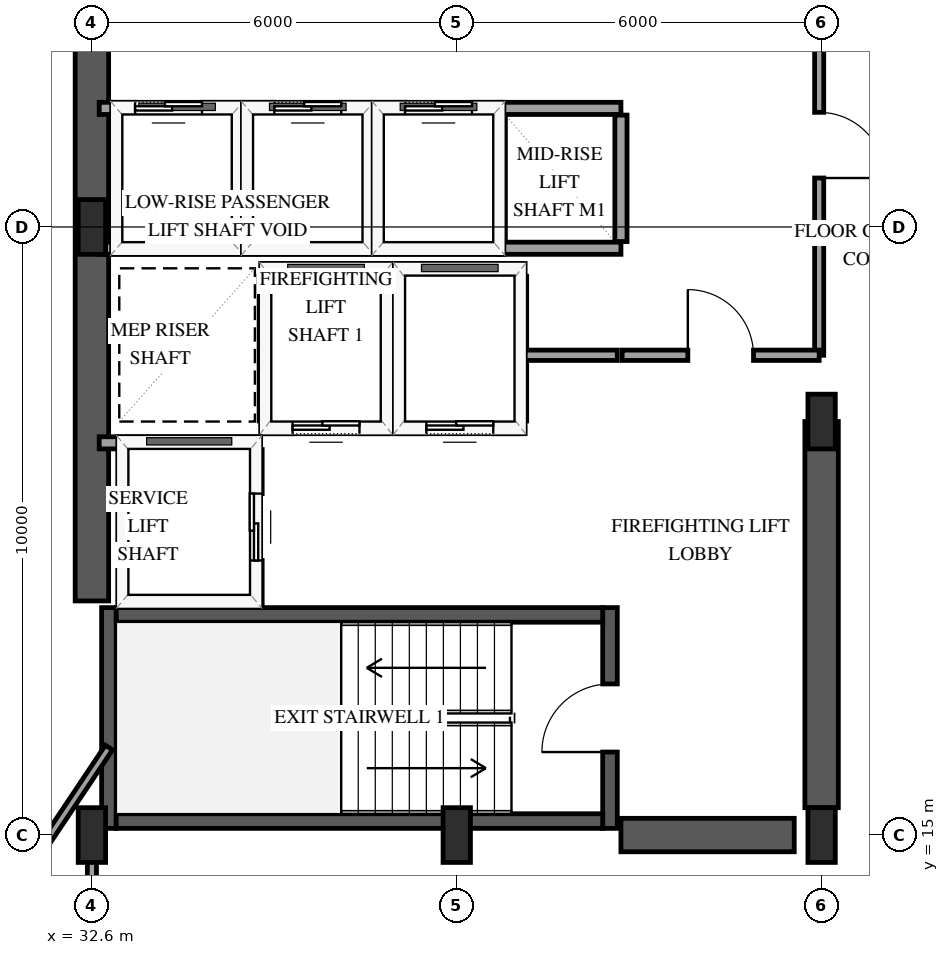
"""IFC4 building model, lengths in metres.
Left out: names, types, materials, properties, quantities, classifications, styles, units other than length and angle.
Written with IfcOpenShell. Run it as: python <this file> out.ifc"""

import sys

from ifc_helpers import new_model, si_unit, direction, frame, frame_2d, origin, origin_2d, place, context, subcontext, project, spatial, rectangle, extrude, element, fill, save


model = new_model("IFC4")
c1 = context("Model", 3, precision=1e-05, world=origin(), true_north=direction((0.0, 1.0)))
c2 = subcontext(c1, "Body", "Model", "MODEL_VIEW")
j1 = project(units=[si_unit("LENGTHUNIT", "METRE"), si_unit("PLANEANGLEUNIT", "RADIAN")], contexts=[c1])
p1 = place(None, origin())
s1 = spatial("IfcSite", under=j1, at=p1, CompositionType="ELEMENT")
p2 = place(p1, origin())
s2 = spatial("IfcBuilding", under=s1, at=p2, CompositionType="ELEMENT")
p3 = place(p2, frame((0.0, 0.0, 87.4)))
s3 = spatial("IfcBuildingStorey", under=s2, at=p3, CompositionType="ELEMENT", Elevation=87.4)
p4 = place(p3, frame((32.88, 15.11, 0.0), z_axis=(0.0, 0.0, 1.0), x_axis=(0.0, 1.0, 0.0)))
e1 = element("IfcWall", 1, at=p4, inside=s3, PredefinedType="SHEAR", context=c2, shape_type="SweptSolid", body=[
    extrude(rectangle(XDim=3.63, YDim=0.24, at=frame_2d((1.815, 0.0))), origin(), (0.0, 0.0, 1.0), 3.9),
])
p5 = place(p3, frame((41.12, 15.11, 0.0), z_axis=(0.0, 0.0, 1.0), x_axis=(0.0, 1.0, 0.0)))
e2 = element("IfcWall", 2, at=p5, inside=s3, PredefinedType="SHEAR", context=c2, shape_type="SweptSolid", body=[
    extrude(rectangle(XDim=3.63, YDim=0.24, at=frame_2d((1.815, 0.0))), origin(), (0.0, 0.0, 1.0), 3.9),
])
p6 = place(p5, frame((1.255, 0.0, 0.0)))
e3 = element("IfcOpeningElement", 3, at=p6, cuts=e2, PredefinedType="OPENING", context=c2, shape_type="SweptSolid", body=[
    extrude(rectangle(XDim=1.12, YDim=2.15, at=frame_2d((0.56, 1.075))), frame((0.0, 0.13, 0.0), z_axis=(0.0, -1.0, 0.0), x_axis=(1.0, 0.0, 0.0)), (0.0, 0.0, 1.0), 0.26),
])
for number, where, z_axis, x_axis in (
    (4, (33.0, 15.23, 0.0), (0.0, 0.0, 1.0), (1.0, 0.0, 0.0)),
    (5, (33.0, 18.62, 0.0), (0.0, 0.0, 1.0), (1.0, 0.0, 0.0)),
):
    element("IfcWall", number, at=place(p3, frame(where, z_axis=z_axis, x_axis=x_axis)), inside=s3, PredefinedType="SHEAR", context=c2, shape_type="SweptSolid", body=[
        extrude(rectangle(XDim=8.0, YDim=0.24, at=frame_2d((4.0, 0.0))), origin(), (0.0, 0.0, 1.0), 3.9),
    ])
p7 = place(p3, frame((32.6, 18.85, 0.0), z_axis=(0.0, 0.0, 1.0), x_axis=(0.0, 1.0, 0.0)))
e6 = element("IfcWall", 6, at=p7, inside=s3, PredefinedType="SHEAR", context=c2, shape_type="SweptSolid", body=[
    extrude(rectangle(XDim=12.3, YDim=0.55, at=frame_2d((6.15, 0.0))), origin(), (0.0, 0.0, 1.0), 3.9),
])
p8 = place(p3, frame((41.3, 15.0, 0.0), z_axis=(0.0, 0.0, 1.0), x_axis=(1.0, 0.0, 0.0)))
e7 = element("IfcWall", 7, at=p8, inside=s3, PredefinedType="SHEAR", context=c2, shape_type="SweptSolid", body=[
    extrude(rectangle(XDim=2.85, YDim=0.55, at=frame_2d((1.425, 0.0))), origin(), (0.0, 0.0, 1.0), 3.9),
])
p9 = place(p3, frame((44.6, 15.45, 0.0), z_axis=(0.0, 0.0, 1.0), x_axis=(0.0, 1.0, 0.0)))
e8 = element("IfcWall", 8, at=p9, inside=s3, PredefinedType="SHEAR", context=c2, shape_type="SweptSolid", body=[
    extrude(rectangle(XDim=6.35, YDim=0.55, at=frame_2d((3.175, 0.0))), origin(), (0.0, 0.0, 1.0), 3.9),
])
for number, where, z_axis, x_axis in (
    (9, (32.6, 15.0, -0.3), (0.0, 0.0, 1.0), (1.0, 0.0, 0.0)),
    (10, (32.6, 25.0, -0.3), (0.0, 0.0, 1.0), (1.0, 0.0, 0.0)),
    (11, (38.6, 15.0, -0.3), (0.0, 0.0, 1.0), (1.0, 0.0, 0.0)),
    (12, (44.6, 15.0, -0.3), (0.0, 0.0, 1.0), (1.0, 0.0, 0.0)),
    (13, (44.6, 21.8, -0.3), (0.0, 0.0, 1.0), (1.0, 0.0, 0.0)),
):
    element("IfcColumn", number, at=place(p3, frame(where, z_axis=z_axis, x_axis=x_axis)), inside=s3, PredefinedType="PILASTER", context=c2, shape_type="SweptSolid", body=[
        extrude(rectangle(XDim=0.45, YDim=0.9, at=origin_2d()), origin(), (0.0, 0.0, 1.0), 4.2),
    ])
p10 = place(p3, frame((35.45, 21.7, 0.0), z_axis=(0.0, 0.0, 1.0), x_axis=(1.0, 0.0, 0.0)))
e14 = element("IfcWall", 14, at=p10, inside=s3, PredefinedType="SOLIDWALL", context=c2, shape_type="SweptSolid", body=[
    extrude(rectangle(XDim=2.0, YDim=0.2, at=frame_2d((1.0, 0.0))), origin(), (0.0, 0.0, 1.0), 3.6),
])
p11 = place(p10, frame((0.45, 0.0, 0.0)))
e15 = element("IfcOpeningElement", 15, at=p11, cuts=e14, PredefinedType="OPENING", context=c2, shape_type="SweptSolid", body=[
    extrude(rectangle(XDim=1.1, YDim=2.15, at=frame_2d((0.55, 1.075))), frame((0.0, 0.11, 0.0), z_axis=(0.0, -1.0, 0.0), x_axis=(1.0, 0.0, 0.0)), (0.0, 0.0, 1.0), 0.22),
])
p12 = place(p3, frame((35.45, 24.3, 0.0), z_axis=(0.0, 0.0, 1.0), x_axis=(1.0, 0.0, 0.0)))
e16 = element("IfcWall", 16, at=p12, inside=s3, PredefinedType="SOLIDWALL", context=c2, shape_type="SweptSolid", body=[
    extrude(rectangle(XDim=2.0, YDim=0.2, at=frame_2d((1.0, 0.0))), origin(), (0.0, 0.0, 1.0), 3.6),
])
for number, where, z_axis, x_axis in (
    (17, (35.45, 21.81, 0.0), (0.0, 0.0, 1.0), (0.0, 1.0, 0.0)),
    (18, (37.45, 21.81, 0.0), (0.0, 0.0, 1.0), (0.0, 1.0, 0.0)),
):
    element("IfcWall", number, at=place(p3, frame(where, z_axis=z_axis, x_axis=x_axis)), inside=s3, PredefinedType="SOLIDWALL", context=c2, shape_type="SweptSolid", body=[
        extrude(rectangle(XDim=2.38, YDim=0.2, at=frame_2d((1.19, 0.0))), origin(), (0.0, 0.0, 1.0), 3.6),
    ])
p13 = place(p3, frame((37.65, 21.7, 0.0), z_axis=(0.0, 0.0, 1.0), x_axis=(1.0, 0.0, 0.0)))
e19 = element("IfcWall", 19, at=p13, inside=s3, PredefinedType="SOLIDWALL", context=c2, shape_type="SweptSolid", body=[
    extrude(rectangle(XDim=2.0, YDim=0.2, at=frame_2d((1.0, 0.0))), origin(), (0.0, 0.0, 1.0), 3.6),
])
p14 = place(p13, frame((0.45, 0.0, 0.0)))
e20 = element("IfcOpeningElement", 20, at=p14, cuts=e19, PredefinedType="OPENING", context=c2, shape_type="SweptSolid", body=[
    extrude(rectangle(XDim=1.1, YDim=2.15, at=frame_2d((0.55, 1.075))), frame((0.0, 0.11, 0.0), z_axis=(0.0, -1.0, 0.0), x_axis=(1.0, 0.0, 0.0)), (0.0, 0.0, 1.0), 0.22),
])
p15 = place(p3, frame((37.65, 24.3, 0.0), z_axis=(0.0, 0.0, 1.0), x_axis=(1.0, 0.0, 0.0)))
e21 = element("IfcWall", 21, at=p15, inside=s3, PredefinedType="SOLIDWALL", context=c2, shape_type="SweptSolid", body=[
    extrude(rectangle(XDim=2.0, YDim=0.2, at=frame_2d((1.0, 0.0))), origin(), (0.0, 0.0, 1.0), 3.6),
])
p16 = place(p3, frame((39.65, 21.81, 0.0), z_axis=(0.0, 0.0, 1.0), x_axis=(0.0, 1.0, 0.0)))
e22 = element("IfcWall", 22, at=p16, inside=s3, PredefinedType="SOLIDWALL", context=c2, shape_type="SweptSolid", body=[
    extrude(rectangle(XDim=2.38, YDim=0.2, at=frame_2d((1.19, 0.0))), origin(), (0.0, 0.0, 1.0), 3.6),
])
p17 = place(p3, frame((32.72, 21.45, 0.0), z_axis=(0.0, 0.0, 1.0), x_axis=(1.0, 0.0, 0.0)))
e23 = element("IfcWall", 23, at=p17, inside=s3, PredefinedType="SOLIDWALL", context=c2, shape_type="SweptSolid", body=[
    extrude(rectangle(XDim=2.58, YDim=0.2, at=frame_2d((1.29, 0.0))), origin(), (0.0, 0.0, 1.0), 3.6),
])
p18 = place(p3, frame((35.3, 18.79, 0.0), z_axis=(0.0, 0.0, 1.0), x_axis=(0.0, 1.0, 0.0)))
e24 = element("IfcWall", 24, at=p18, inside=s3, PredefinedType="SOLIDWALL", context=c2, shape_type="SweptSolid", body=[
    extrude(rectangle(XDim=2.55, YDim=0.2, at=frame_2d((1.275, 0.0))), origin(), (0.0, 0.0, 1.0), 3.6),
])
p19 = place(p18, frame((0.725, 0.0, 0.0)))
e25 = element("IfcOpeningElement", 25, at=p19, cuts=e24, PredefinedType="OPENING", context=c2, shape_type="SweptSolid", body=[
    extrude(rectangle(XDim=1.1, YDim=2.15, at=frame_2d((0.55, 1.075))), frame((0.0, 0.11, 0.0), z_axis=(0.0, -1.0, 0.0), x_axis=(1.0, 0.0, 0.0)), (0.0, 0.0, 1.0), 0.22),
])
p20 = place(p3, frame((32.72, 24.65, 0.0), z_axis=(0.0, 0.0, 1.0), x_axis=(1.0, 0.0, 0.0)))
e26 = element("IfcWall", 26, at=p20, inside=s3, PredefinedType="SOLIDWALL", context=c2, shape_type="SweptSolid", body=[
    extrude(rectangle(XDim=2.28, YDim=0.2, at=frame_2d((1.14, 0.0))), origin(), (0.0, 0.0, 1.0), 3.6),
])
p21 = place(p3, frame((32.72, 26.95, 0.0), z_axis=(0.0, 0.0, 1.0), x_axis=(1.0, 0.0, 0.0)))
e27 = element("IfcWall", 27, at=p21, inside=s3, PredefinedType="SOLIDWALL", context=c2, shape_type="SweptSolid", body=[
    extrude(rectangle(XDim=2.28, YDim=0.2, at=frame_2d((1.14, 0.0))), origin(), (0.0, 0.0, 1.0), 2.974),
])
p22 = place(p21, frame((0.59, 0.0, 0.0)))
e28 = element("IfcOpeningElement", 28, at=p22, cuts=e27, PredefinedType="OPENING", context=c2, shape_type="SweptSolid", body=[
    extrude(rectangle(XDim=1.1, YDim=2.15, at=frame_2d((0.55, 1.075))), frame((0.0, 0.11, 0.0), z_axis=(0.0, -1.0, 0.0), x_axis=(1.0, 0.0, 0.0)), (0.0, 0.0, 1.0), 0.22),
])
p23 = place(p3, frame((35.0, 24.76, 0.0), z_axis=(0.0, 0.0, 1.0), x_axis=(0.0, 1.0, 0.0)))
e29 = element("IfcWall", 29, at=p23, inside=s3, PredefinedType="SOLIDWALL", context=c2, shape_type="SweptSolid", body=[
    extrude(rectangle(XDim=2.08, YDim=0.2, at=frame_2d((1.04, 0.0))), origin(), (0.0, 0.0, 1.0), 3.6),
])
p24 = place(p3, frame((35.15, 24.65, 0.0), z_axis=(0.0, 0.0, 1.0), x_axis=(1.0, 0.0, 0.0)))
e30 = element("IfcWall", 30, at=p24, inside=s3, PredefinedType="SOLIDWALL", context=c2, shape_type="SweptSolid", body=[
    extrude(rectangle(XDim=2.0, YDim=0.2, at=frame_2d((1.0, 0.0))), origin(), (0.0, 0.0, 1.0), 3.6),
])
p25 = place(p3, frame((35.15, 26.95, 0.0), z_axis=(0.0, 0.0, 1.0), x_axis=(1.0, 0.0, 0.0)))
e31 = element("IfcWall", 31, at=p25, inside=s3, PredefinedType="SOLIDWALL", context=c2, shape_type="SweptSolid", body=[
    extrude(rectangle(XDim=2.0, YDim=0.2, at=frame_2d((1.0, 0.0))), origin(), (0.0, 0.0, 1.0), 2.974),
])
p26 = place(p25, frame((0.45, 0.0, 0.0)))
e32 = element("IfcOpeningElement", 32, at=p26, cuts=e31, PredefinedType="OPENING", context=c2, shape_type="SweptSolid", body=[
    extrude(rectangle(XDim=1.1, YDim=2.15, at=frame_2d((0.55, 1.075))), frame((0.0, 0.11, 0.0), z_axis=(0.0, -1.0, 0.0), x_axis=(1.0, 0.0, 0.0)), (0.0, 0.0, 1.0), 0.22),
])
p27 = place(p3, frame((37.15, 24.76, 0.0), z_axis=(0.0, 0.0, 1.0), x_axis=(0.0, 1.0, 0.0)))
e33 = element("IfcWall", 33, at=p27, inside=s3, PredefinedType="SOLIDWALL", context=c2, shape_type="SweptSolid", body=[
    extrude(rectangle(XDim=2.08, YDim=0.2, at=frame_2d((1.04, 0.0))), origin(), (0.0, 0.0, 1.0), 3.6),
])
p28 = place(p3, frame((37.3, 24.65, 0.0), z_axis=(0.0, 0.0, 1.0), x_axis=(1.0, 0.0, 0.0)))
e34 = element("IfcWall", 34, at=p28, inside=s3, PredefinedType="SOLIDWALL", context=c2, shape_type="SweptSolid", body=[
    extrude(rectangle(XDim=2.0, YDim=0.2, at=frame_2d((1.0, 0.0))), origin(), (0.0, 0.0, 1.0), 3.6),
])
p29 = place(p3, frame((37.3, 26.95, 0.0), z_axis=(0.0, 0.0, 1.0), x_axis=(1.0, 0.0, 0.0)))
e35 = element("IfcWall", 35, at=p29, inside=s3, PredefinedType="SOLIDWALL", context=c2, shape_type="SweptSolid", body=[
    extrude(rectangle(XDim=2.0, YDim=0.2, at=frame_2d((1.0, 0.0))), origin(), (0.0, 0.0, 1.0), 2.974),
])
p30 = place(p29, frame((0.45, 0.0, 0.0)))
e36 = element("IfcOpeningElement", 36, at=p30, cuts=e35, PredefinedType="OPENING", context=c2, shape_type="SweptSolid", body=[
    extrude(rectangle(XDim=1.1, YDim=2.15, at=frame_2d((0.55, 1.075))), frame((0.0, 0.11, 0.0), z_axis=(0.0, -1.0, 0.0), x_axis=(1.0, 0.0, 0.0)), (0.0, 0.0, 1.0), 0.22),
])
p31 = place(p3, frame((39.3, 24.76, 0.0), z_axis=(0.0, 0.0, 1.0), x_axis=(0.0, 1.0, 0.0)))
e37 = element("IfcWall", 37, at=p31, inside=s3, PredefinedType="SOLIDWALL", context=c2, shape_type="SweptSolid", body=[
    extrude(rectangle(XDim=2.08, YDim=0.2, at=frame_2d((1.04, 0.0))), origin(), (0.0, 0.0, 1.0), 3.6),
])
p32 = place(p3, frame((39.3, 24.65, 0.0), z_axis=(0.0, 0.0, 1.0), x_axis=(1.0, 0.0, 0.0)))
e38 = element("IfcWall", 38, at=p32, inside=s3, PredefinedType="SOLIDWALL", context=c2, shape_type="SweptSolid", body=[
    extrude(rectangle(XDim=2.0, YDim=0.2, at=frame_2d((1.0, 0.0))), origin(), (0.0, 0.0, 1.0), 3.6),
])
p33 = place(p3, frame((39.3, 26.95, 0.0), z_axis=(0.0, 0.0, 1.0), x_axis=(1.0, 0.0, 0.0)))
e39 = element("IfcWall", 39, at=p33, inside=s3, PredefinedType="SOLIDWALL", context=c2, shape_type="SweptSolid", body=[
    extrude(rectangle(XDim=2.0, YDim=0.2, at=frame_2d((1.0, 0.0))), origin(), (0.0, 0.0, 1.0), 2.974),
])
p34 = place(p3, frame((41.3, 24.76, 0.0), z_axis=(0.0, 0.0, 1.0), x_axis=(0.0, 1.0, 0.0)))
e40 = element("IfcWall", 40, at=p34, inside=s3, PredefinedType="SOLIDWALL", context=c2, shape_type="SweptSolid", body=[
    extrude(rectangle(XDim=2.08, YDim=0.2, at=frame_2d((1.04, 0.0))), origin(), (0.0, 0.0, 1.0), 3.6),
])
p35 = place(p3, frame((44.56, 29.8, 0.0), z_axis=(0.0, 0.0, 1.0), x_axis=(0.0, -1.0, 0.0)))
e41 = element("IfcWall", 41, at=p35, inside=s3, PredefinedType="PARTITIONING", context=c2, shape_type="SweptSolid", body=[
    extrude(rectangle(XDim=6.91, YDim=0.15, at=frame_2d((3.455, 0.0))), origin(), (0.0, 0.0, 1.0), 2.64),
])
p36 = place(p35, frame((2.915, 0.0, 0.0)))
e42 = element("IfcOpeningElement", 42, at=p36, cuts=e41, PredefinedType="OPENING", context=c2, shape_type="SweptSolid", body=[
    extrude(rectangle(XDim=1.08, YDim=2.15, at=frame_2d((0.54, 1.075))), frame((0.0, 0.085, 0.0), z_axis=(0.0, -1.0, 0.0), x_axis=(1.0, 0.0, 0.0)), (0.0, 0.0, 1.0), 0.17),
])
p37 = place(p3, frame((32.88, 16.439, 0.0), z_axis=(0.0, 0.0, 1.0), x_axis=(-0.5557844679, -0.831326425203, 0.0)))
e43 = element("IfcWall", 43, at=p37, inside=s3, PredefinedType="PARTITIONING", context=c2, shape_type="SweptSolid", body=[
    extrude(rectangle(XDim=4.363, YDim=0.14, at=frame_2d((2.181, 0.0))), origin(), (0.0, 0.0, 1.0), 3.6),
])
p38 = place(p3, frame((41.32, 22.89, 0.0), z_axis=(0.0, 0.0, 1.0), x_axis=(1.0, 0.0, 0.0)))
e44 = element("IfcWall", 44, at=p38, inside=s3, PredefinedType="PARTITIONING", context=c2, shape_type="SweptSolid", body=[
    extrude(rectangle(XDim=3.24, YDim=0.17, at=frame_2d((1.62, 0.0))), origin(), (0.0, 0.0, 1.0), 3.6),
])
p39 = place(p38, frame((1.08, 0.0, 0.0)))
e45 = element("IfcOpeningElement", 45, at=p39, cuts=e44, PredefinedType="OPENING", context=c2, shape_type="SweptSolid", body=[
    extrude(rectangle(XDim=1.08, YDim=2.15, at=frame_2d((0.54, 1.075))), frame((0.0, 0.095, 0.0), z_axis=(0.0, -1.0, 0.0), x_axis=(1.0, 0.0, 0.0)), (0.0, 0.0, 1.0), 0.19),
])
p40 = place(p3, frame((32.6, 13.02, 0.0), z_axis=(0.0, 0.0, 1.0), x_axis=(0.0, 1.0, 0.0)))
e46 = element("IfcWall", 46, at=p40, inside=s3, PredefinedType="PARTITIONING", context=c2, shape_type="SweptSolid", body=[
    extrude(rectangle(XDim=1.91, YDim=0.15, at=frame_2d((0.955, 0.0))), origin(), (0.0, 0.0, 1.0), 3.6),
])
p41 = place(p3, frame((39.72, 22.89, 0.0), z_axis=(0.0, 0.0, 1.0), x_axis=(1.0, 0.0, 0.0)))
e47 = element("IfcWall", 47, at=p41, inside=s3, PredefinedType="PARTITIONING", context=c2, shape_type="SweptSolid", body=[
    extrude(rectangle(XDim=1.52, YDim=0.17, at=frame_2d((0.76, 0.0))), origin(), (0.0, 0.0, 1.0), 3.6),
])
p42 = place(p11, origin())
e48 = element("IfcDoor", 48, at=p42, inside=s3, OperationType="SLIDING_TO_LEFT", PredefinedType="DOOR", context=c2, shape_type="SweptSolid", body=[
    extrude(rectangle(XDim=1.1, YDim=2.15, at=frame_2d((0.55, 1.075))), frame((0.0, 0.025, 0.0), z_axis=(0.0, -1.0, 0.0), x_axis=(1.0, 0.0, 0.0)), (0.0, 0.0, 1.0), 0.05),
])
fill(e15, e48)
p43 = place(p14, origin())
e49 = element("IfcDoor", 49, at=p43, inside=s3, OperationType="SLIDING_TO_LEFT", PredefinedType="DOOR", context=c2, shape_type="SweptSolid", body=[
    extrude(rectangle(XDim=1.1, YDim=2.15, at=frame_2d((0.55, 1.075))), frame((0.0, 0.025, 0.0), z_axis=(0.0, -1.0, 0.0), x_axis=(1.0, 0.0, 0.0)), (0.0, 0.0, 1.0), 0.05),
])
fill(e20, e49)
p44 = place(p19, origin())
e50 = element("IfcDoor", 50, at=p44, inside=s3, OperationType="SLIDING_TO_LEFT", PredefinedType="DOOR", context=c2, shape_type="SweptSolid", body=[
    extrude(rectangle(XDim=1.1, YDim=2.15, at=frame_2d((0.55, 1.075))), frame((0.0, 0.025, 0.0), z_axis=(0.0, -1.0, 0.0), x_axis=(1.0, 0.0, 0.0)), (0.0, 0.0, 1.0), 0.05),
])
fill(e25, e50)
p45 = place(p22, origin())
e51 = element("IfcDoor", 51, at=p45, inside=s3, OperationType="SLIDING_TO_LEFT", PredefinedType="DOOR", context=c2, shape_type="SweptSolid", body=[
    extrude(rectangle(XDim=1.1, YDim=2.15, at=frame_2d((0.55, 1.075))), frame((0.0, 0.025, 0.0), z_axis=(0.0, -1.0, 0.0), x_axis=(1.0, 0.0, 0.0)), (0.0, 0.0, 1.0), 0.05),
])
fill(e28, e51)
p46 = place(p26, origin())
e52 = element("IfcDoor", 52, at=p46, inside=s3, OperationType="SLIDING_TO_LEFT", PredefinedType="DOOR", context=c2, shape_type="SweptSolid", body=[
    extrude(rectangle(XDim=1.1, YDim=2.15, at=frame_2d((0.55, 1.075))), frame((0.0, 0.025, 0.0), z_axis=(0.0, -1.0, 0.0), x_axis=(1.0, 0.0, 0.0)), (0.0, 0.0, 1.0), 0.05),
])
fill(e32, e52)
p47 = place(p30, origin())
e53 = element("IfcDoor", 53, at=p47, inside=s3, OperationType="SLIDING_TO_LEFT", PredefinedType="DOOR", context=c2, shape_type="SweptSolid", body=[
    extrude(rectangle(XDim=1.1, YDim=2.15, at=frame_2d((0.55, 1.075))), frame((0.0, 0.025, 0.0), z_axis=(0.0, -1.0, 0.0), x_axis=(1.0, 0.0, 0.0)), (0.0, 0.0, 1.0), 0.05),
])
fill(e36, e53)
p48 = place(p6, origin())
e54 = element("IfcDoor", 54, at=p48, inside=s3, OperationType="SINGLE_SWING_LEFT", PredefinedType="DOOR", context=c2, shape_type="SweptSolid", body=[
    extrude(rectangle(XDim=1.12, YDim=2.15, at=frame_2d((0.56, 1.075))), frame((0.0, 0.025, 0.0), z_axis=(0.0, -1.0, 0.0), x_axis=(1.0, 0.0, 0.0)), (0.0, 0.0, 1.0), 0.05),
])
fill(e3, e54)
p49 = place(p36, origin())
e55 = element("IfcDoor", 55, at=p49, inside=s3, OperationType="SINGLE_SWING_RIGHT", PredefinedType="DOOR", context=c2, shape_type="SweptSolid", body=[
    extrude(rectangle(XDim=1.08, YDim=2.15, at=frame_2d((0.54, 1.075))), frame((0.0, 0.025, 0.0), z_axis=(0.0, -1.0, 0.0), x_axis=(1.0, 0.0, 0.0)), (0.0, 0.0, 1.0), 0.05),
])
fill(e42, e55)
p50 = place(p39, origin())
e56 = element("IfcDoor", 56, at=p50, inside=s3, OperationType="SINGLE_SWING_LEFT", PredefinedType="DOOR", context=c2, shape_type="SweptSolid", body=[
    extrude(rectangle(XDim=1.08, YDim=2.15, at=frame_2d((0.54, 1.075))), frame((0.0, 0.025, 0.0), z_axis=(0.0, -1.0, 0.0), x_axis=(1.0, 0.0, 0.0)), (0.0, 0.0, 1.0), 0.05),
])
fill(e45, e56)
save(model, sys.argv[1])
